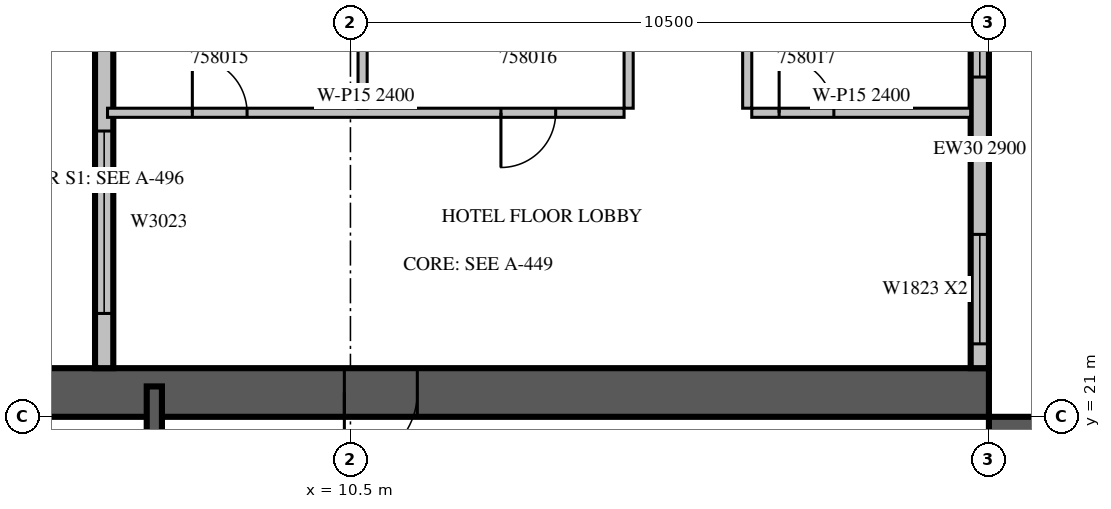
"""IFC4 building model, lengths in metres.
Left out: names, types, materials, properties, quantities, classifications, styles, units other than length and angle.
Written with IfcOpenShell. Run it as: python <this file> out.ifc"""

import sys

from ifc_helpers import new_model, si_unit, direction, frame, frame_2d, origin, place, context, subcontext, project, spatial, rectangle, extrude, source, transform, mapped, element, fill, save


model = new_model("IFC4")
c1 = context("Model", 3, precision=1e-05, world=origin(), true_north=direction((0.0, 1.0)))
c2 = subcontext(c1, "Body", "Model", "MODEL_VIEW")
j1 = project(units=[si_unit("LENGTHUNIT", "METRE"), si_unit("PLANEANGLEUNIT", "RADIAN")], contexts=[c1])
p1 = place(None, origin())
s1 = spatial("IfcSite", under=j1, at=p1, CompositionType="ELEMENT")
p2 = place(p1, origin())
s2 = spatial("IfcBuilding", under=s1, at=p2, CompositionType="ELEMENT")
p3 = place(p2, frame((0.0, 0.0, 253.8)))
s3 = spatial("IfcBuildingStorey", under=s2, at=p3, CompositionType="ELEMENT", Elevation=253.8)
m1 = source(origin(), c2, "Body", "SweptSolid", [
    extrude(rectangle(XDim=16.8, YDim=0.8, at=frame_2d((8.4, 0.0))), origin(), (0.0, 0.0, 1.0), 3.8),
])
p4 = place(p3, frame((21.4, 4.2, 0.0), z_axis=(0.0, 0.0, 1.0), x_axis=(0.0, 1.0, 0.0)))
e1 = element("IfcWall", 1, at=p4, inside=s3, PredefinedType="SHEAR", context=c2, shape_type="MappedRepresentation", body=[
    mapped(m1, transform((0.0, 0.0, 0.0), scale=1.0)),
])
m2 = source(origin(), c2, "Body", "SweptSolid", [
    extrude(rectangle(XDim=2.2, YDim=2.1, at=frame_2d((1.1, 1.05))), frame((0.0, 0.41, 0.0), z_axis=(0.0, -1.0, 0.0), x_axis=(1.0, 0.0, 0.0)), (0.0, 0.0, 1.0), 0.82),
])
p5 = place(p4, frame((4.2, 0.0, 0.0)))
e2 = element("IfcOpeningElement", 2, at=p5, cuts=e1, PredefinedType="OPENING", context=c2, shape_type="MappedRepresentation", body=[
    mapped(m2, transform((0.0, 0.0, 0.0), scale=1.0)),
])
m3 = source(origin(), c2, "Body", "SweptSolid", [
    extrude(rectangle(XDim=1.2, YDim=2.1, at=frame_2d((0.6, 1.05))), frame((0.0, 0.41, 0.0), z_axis=(0.0, -1.0, 0.0), x_axis=(1.0, 0.0, 0.0)), (0.0, 0.0, 1.0), 0.82),
])
p6 = place(p4, frame((14.7, 0.0, 0.0)))
e3 = element("IfcOpeningElement", 3, at=p6, cuts=e1, PredefinedType="OPENING", context=c2, shape_type="MappedRepresentation", body=[
    mapped(m3, transform((0.0, 0.0, 0.0), scale=1.0)),
])
p7 = place(p3, frame((4.2, 21.4, 0.0), z_axis=(0.0, 0.0, 1.0), x_axis=(1.0, 0.0, 0.0)))
e4 = element("IfcWall", 4, at=p7, inside=s3, PredefinedType="SHEAR", context=c2, shape_type="MappedRepresentation", body=[
    mapped(m1, transform((0.0, 0.0, 0.0), scale=1.0)),
])
p8 = place(p7, frame((6.2, 0.0, 0.0)))
e5 = element("IfcOpeningElement", 5, at=p8, cuts=e4, PredefinedType="OPENING", context=c2, shape_type="MappedRepresentation", body=[
    mapped(m3, transform((0.0, 0.0, 0.0), scale=1.0)),
])
m4 = source(origin(), c2, "Body", "SweptSolid", [
    extrude(rectangle(XDim=7.2, YDim=0.3, at=frame_2d((3.6, 0.0))), origin(), (0.0, 0.0, 1.0), 2.9),
])
p9 = place(p3, frame((20.85, 21.8, 0.0), z_axis=(0.0, 0.0, 1.0), x_axis=(0.0, 1.0, 0.0)))
e6 = element("IfcWall", 6, at=p9, inside=s3, PredefinedType="STANDARD", context=c2, shape_type="MappedRepresentation", body=[
    mapped(m4, transform((0.0, 0.0, 0.0), scale=1.0)),
])
m5 = source(origin(), c2, "Body", "SweptSolid", [
    extrude(rectangle(XDim=1.8, YDim=2.3, at=frame_2d((0.9, 1.15))), frame((0.0, 0.16, 0.0), z_axis=(0.0, -1.0, 0.0), x_axis=(1.0, 0.0, 0.0)), (0.0, 0.0, 1.0), 0.32),
])
p10 = place(p9, frame((0.4, 0.0, 0.6)))
e7 = element("IfcOpeningElement", 7, at=p10, cuts=e6, PredefinedType="OPENING", context=c2, shape_type="MappedRepresentation", body=[
    mapped(m5, transform((0.0, 0.0, 0.0), scale=1.0)),
])
p11 = place(p9, frame((4.787, 0.0, 0.6)))
e8 = element("IfcOpeningElement", 8, at=p11, cuts=e6, PredefinedType="OPENING", context=c2, shape_type="MappedRepresentation", body=[
    mapped(m5, transform((0.0, 0.0, 0.0), scale=1.0)),
])
m6 = source(origin(), c2, "Body", "SweptSolid", [
    extrude(rectangle(XDim=16.6, YDim=0.3, at=frame_2d((8.3, 0.0))), origin(), (0.0, 0.0, 1.0), 3.4),
])
p12 = place(p3, frame((6.45, 38.4, 0.0), z_axis=(0.0, 0.0, 1.0), x_axis=(0.0, -1.0, 0.0)))
e9 = element("IfcWall", 9, at=p12, inside=s3, PredefinedType="STANDARD", context=c2, shape_type="MappedRepresentation", body=[
    mapped(m6, transform((0.0, 0.0, 0.0), scale=1.0)),
])
p13 = place(p12, frame((1.15, 0.0, 0.6)))
e10 = element("IfcOpeningElement", 10, at=p13, cuts=e9, PredefinedType="OPENING", context=c2, shape_type="MappedRepresentation", body=[
    mapped(m5, transform((0.0, 0.0, 0.0), scale=1.0)),
])
p14 = place(p12, frame((9.438, 0.0, 0.6)))
e11 = element("IfcOpeningElement", 11, at=p14, cuts=e9, PredefinedType="OPENING", context=c2, shape_type="MappedRepresentation", body=[
    mapped(m5, transform((0.0, 0.0, 0.0), scale=1.0)),
])
m7 = source(origin(), c2, "Body", "SweptSolid", [
    extrude(rectangle(XDim=3.0, YDim=2.3, at=frame_2d((1.5, 1.15))), frame((0.0, 0.16, 0.0), z_axis=(0.0, -1.0, 0.0), x_axis=(1.0, 0.0, 0.0)), (0.0, 0.0, 1.0), 0.32),
])
p15 = place(p12, frame((12.7, 0.0, 0.6)))
e12 = element("IfcOpeningElement", 12, at=p15, cuts=e9, PredefinedType="OPENING", context=c2, shape_type="MappedRepresentation", body=[
    mapped(m7, transform((0.0, 0.0, 0.0), scale=1.0)),
])
m8 = source(origin(), c2, "Body", "SweptSolid", [
    extrude(rectangle(XDim=1.0, YDim=2.1, at=frame_2d((0.5, 1.05))), frame((0.0, 0.16, 0.0), z_axis=(0.0, -1.0, 0.0), x_axis=(1.0, 0.0, 0.0)), (0.0, 0.0, 1.0), 0.32),
])
p16 = place(p12, frame((5.45, 0.0, 0.0)))
e13 = element("IfcOpeningElement", 13, at=p16, cuts=e9, PredefinedType="OPENING", context=c2, shape_type="MappedRepresentation", body=[
    mapped(m8, transform((0.0, 0.0, 0.0), scale=1.0)),
])
m9 = source(origin(), c2, "Body", "SweptSolid", [
    extrude(rectangle(XDim=6.6, YDim=0.25, at=frame_2d((3.3, 0.0))), origin(), (0.0, 0.0, 1.0), 3.4),
])
p17 = place(p3, frame((7.275, 14.9, 0.0), z_axis=(0.0, 0.0, 1.0), x_axis=(0.0, 1.0, 0.0)))
e14 = element("IfcWall", 14, at=p17, inside=s3, PredefinedType="SOLIDWALL", context=c2, shape_type="MappedRepresentation", body=[
    mapped(m9, transform((0.0, 0.0, 0.0), scale=1.0)),
])
m10 = source(origin(), c2, "Body", "SweptSolid", [
    extrude(rectangle(XDim=1.1, YDim=2.1, at=frame_2d((0.55, 1.05))), frame((0.0, 0.135, 0.0), z_axis=(0.0, -1.0, 0.0), x_axis=(1.0, 0.0, 0.0)), (0.0, 0.0, 1.0), 0.27),
])
p18 = place(p17, frame((0.15, 0.0, 0.0)))
e15 = element("IfcOpeningElement", 15, at=p18, cuts=e14, PredefinedType="OPENING", context=c2, shape_type="MappedRepresentation", body=[
    mapped(m10, transform((0.0, 0.0, 0.0), scale=1.0)),
])
m11 = source(origin(), c2, "Body", "SweptSolid", [
    extrude(rectangle(XDim=8.495, YDim=0.15, at=frame_2d((4.247, 0.0))), origin(), (0.0, 0.0, 1.0), 2.4),
])
p19 = place(p3, frame((6.505, 26.0, 0.0), z_axis=(0.0, 0.0, 1.0), x_axis=(1.0, 0.0, 0.0)))
e16 = element("IfcWall", 16, at=p19, inside=s3, PredefinedType="PARTITIONING", context=c2, shape_type="MappedRepresentation", body=[
    mapped(m11, transform((0.0, 0.0, 0.0), scale=1.0)),
])
m12 = source(origin(), c2, "Body", "SweptSolid", [
    extrude(rectangle(XDim=0.9, YDim=2.1, at=frame_2d((0.45, 1.05))), frame((0.0, 0.085, 0.0), z_axis=(0.0, -1.0, 0.0), x_axis=(1.0, 0.0, 0.0)), (0.0, 0.0, 1.0), 0.17),
])
p20 = place(p19, frame((1.395, 0.0, 0.0)))
e17 = element("IfcOpeningElement", 17, at=p20, cuts=e16, PredefinedType="OPENING", context=c2, shape_type="MappedRepresentation", body=[
    mapped(m12, transform((0.0, 0.0, 0.0), scale=1.0)),
])
p21 = place(p19, frame((6.47, 0.0, 0.0)))
e18 = element("IfcOpeningElement", 18, at=p21, cuts=e16, PredefinedType="OPENING", context=c2, shape_type="MappedRepresentation", body=[
    mapped(m12, transform((0.0, 0.0, 0.0), scale=1.0)),
])
m13 = source(origin(), c2, "Body", "SweptSolid", [
    extrude(rectangle(XDim=3.6, YDim=0.15, at=frame_2d((1.8, 0.0))), origin(), (0.0, 0.0, 1.0), 2.4),
])
p22 = place(p3, frame((17.1, 26.0, 0.0), z_axis=(0.0, 0.0, 1.0), x_axis=(1.0, 0.0, 0.0)))
e19 = element("IfcWall", 19, at=p22, inside=s3, PredefinedType="PARTITIONING", context=c2, shape_type="MappedRepresentation", body=[
    mapped(m13, transform((0.0, 0.0, 0.0), scale=1.0)),
])
p23 = place(p22, frame((0.45, 0.0, 0.0)))
e20 = element("IfcOpeningElement", 20, at=p23, cuts=e19, PredefinedType="OPENING", context=c2, shape_type="MappedRepresentation", body=[
    mapped(m12, transform((0.0, 0.0, 0.0), scale=1.0)),
])
p24 = place(p3, frame((10.7, 26.075, 0.0), z_axis=(0.0, 0.0, 1.0), x_axis=(0.0, 1.0, 0.0)))
e21 = element("IfcWall", 21, at=p24, inside=s3, PredefinedType="PARTITIONING", context=c2, shape_type="SweptSolid", body=[
    extrude(rectangle(XDim=2.926, YDim=0.15, at=frame_2d((1.463, 0.0))), origin(), (0.0, 0.0, 1.0), 2.4),
])
p25 = place(p3, frame((15.075, 26.075, 0.0), z_axis=(0.0, 0.0, 1.0), x_axis=(0.0, 1.0, 0.0)))
e22 = element("IfcWall", 22, at=p25, inside=s3, PredefinedType="PARTITIONING", context=c2, shape_type="SweptSolid", body=[
    extrude(rectangle(XDim=3.25, YDim=0.15, at=frame_2d((1.625, 0.0))), origin(), (0.0, 0.0, 1.0), 2.9),
])
m14 = source(origin(), c2, "Body", "SweptSolid", [
    extrude(rectangle(XDim=3.25, YDim=0.15, at=frame_2d((1.625, 0.0))), origin(), (0.0, 0.0, 1.0), 2.9),
])
p26 = place(p3, frame((17.025, 29.325, 0.0), z_axis=(0.0, 0.0, 1.0), x_axis=(0.0, -1.0, 0.0)))
e23 = element("IfcWall", 23, at=p26, inside=s3, PredefinedType="PARTITIONING", context=c2, shape_type="MappedRepresentation", body=[
    mapped(m14, transform((0.0, 0.0, 0.0), scale=1.0)),
])
m15 = source(origin(), c2, "Body", "SweptSolid", [
    extrude(rectangle(XDim=1.8, YDim=2.3, at=frame_2d((0.9, 1.15))), frame((0.0, 0.03, 0.0), z_axis=(0.0, -1.0, 0.0), x_axis=(1.0, 0.0, 0.0)), (0.0, 0.0, 1.0), 0.06),
])
p27 = place(p10, origin())
e24 = element("IfcWindow", 24, at=p27, inside=s3, PartitioningType="SINGLE_PANEL", PredefinedType="WINDOW", context=c2, shape_type="MappedRepresentation", body=[
    mapped(m15, transform((0.0, 0.0, 0.0), scale=1.0)),
])
fill(e7, e24)
p28 = place(p11, origin())
e25 = element("IfcWindow", 25, at=p28, inside=s3, PartitioningType="SINGLE_PANEL", PredefinedType="WINDOW", context=c2, shape_type="MappedRepresentation", body=[
    mapped(m15, transform((0.0, 0.0, 0.0), scale=1.0)),
])
fill(e8, e25)
m16 = source(origin(), c2, "Body", "SweptSolid", [
    extrude(rectangle(XDim=3.0, YDim=2.3, at=frame_2d((1.5, 1.15))), frame((0.0, 0.03, 0.0), z_axis=(0.0, -1.0, 0.0), x_axis=(1.0, 0.0, 0.0)), (0.0, 0.0, 1.0), 0.06),
])
p29 = place(p15, origin())
e26 = element("IfcWindow", 26, at=p29, inside=s3, PartitioningType="SINGLE_PANEL", PredefinedType="WINDOW", context=c2, shape_type="MappedRepresentation", body=[
    mapped(m16, transform((0.0, 0.0, 0.0), scale=1.0)),
])
fill(e12, e26)
m17 = source(origin(), c2, "Body", "SweptSolid", [
    extrude(rectangle(XDim=1.2, YDim=2.1, at=frame_2d((0.6, 1.05))), frame((0.0, 0.025, 0.0), z_axis=(0.0, -1.0, 0.0), x_axis=(1.0, 0.0, 0.0)), (0.0, 0.0, 1.0), 0.05),
])
p30 = place(p8, origin())
e27 = element("IfcDoor", 27, at=p30, inside=s3, OperationType="SINGLE_SWING_RIGHT", PredefinedType="DOOR", context=c2, shape_type="MappedRepresentation", body=[
    mapped(m17, transform((0.0, 0.0, 0.0), scale=1.0)),
])
fill(e5, e27)
m18 = source(origin(), c2, "Body", "SweptSolid", [
    extrude(rectangle(XDim=0.9, YDim=2.1, at=frame_2d((0.45, 1.05))), frame((0.0, 0.025, 0.0), z_axis=(0.0, -1.0, 0.0), x_axis=(1.0, 0.0, 0.0)), (0.0, 0.0, 1.0), 0.05),
])
p31 = place(p20, origin())
e28 = element("IfcDoor", 28, at=p31, inside=s3, OperationType="SINGLE_SWING_LEFT", PredefinedType="DOOR", context=c2, shape_type="MappedRepresentation", body=[
    mapped(m18, transform((0.0, 0.0, 0.0), scale=1.0)),
])
fill(e17, e28)
p32 = place(p21, origin())
e29 = element("IfcDoor", 29, at=p32, inside=s3, OperationType="SINGLE_SWING_RIGHT", PredefinedType="DOOR", context=c2, shape_type="MappedRepresentation", body=[
    mapped(m18, transform((0.0, 0.0, 0.0), scale=1.0)),
])
fill(e18, e29)
p33 = place(p23, origin())
e30 = element("IfcDoor", 30, at=p33, inside=s3, OperationType="SINGLE_SWING_LEFT", PredefinedType="DOOR", context=c2, shape_type="MappedRepresentation", body=[
    mapped(m18, transform((0.0, 0.0, 0.0), scale=1.0)),
])
fill(e20, e30)
save(model, sys.argv[1])
